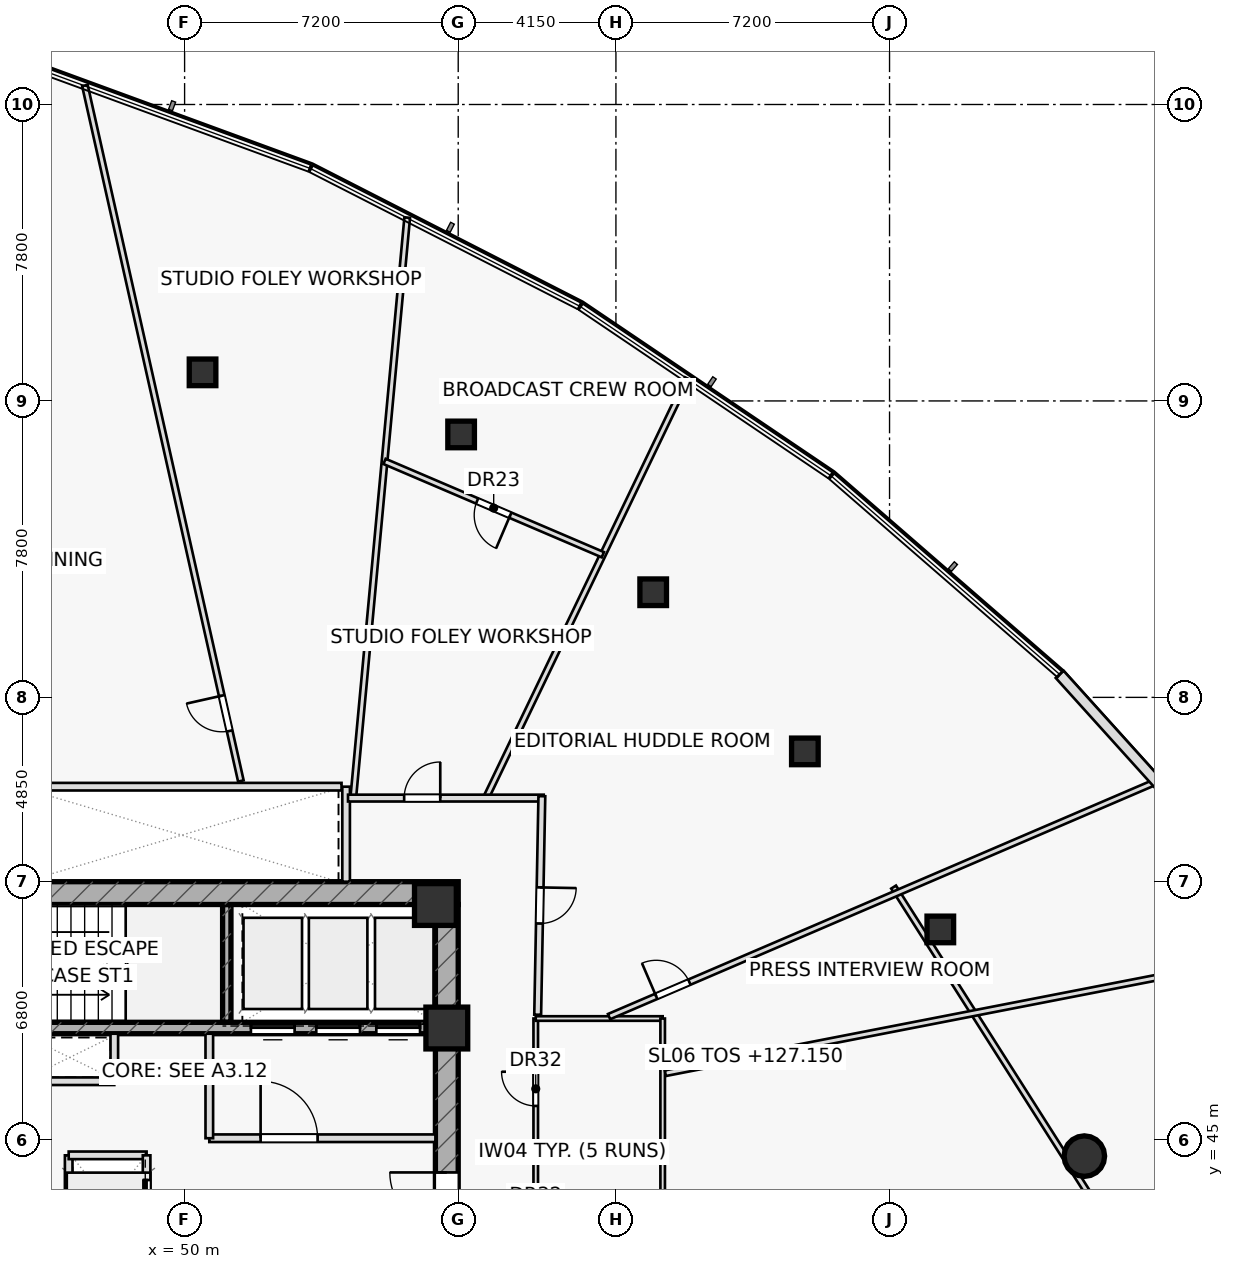
"""IFC4 building model, lengths in metres.
Left out: names, types, materials, properties, quantities, classifications, styles, units other than length and angle.
Written with IfcOpenShell. Run it as: python <this file> out.ifc"""

import sys

from ifc_helpers import new_model, si_unit, direction, frame, frame_2d, origin, origin_2d, place, context, subcontext, project, spatial, rectangle, hollow_rectangle, hollow_circle, extrude, element, fill, save


model = new_model("IFC4")
c1 = context("Model", 3, precision=1e-05, world=origin(), true_north=direction((0.0, 1.0)))
c2 = subcontext(c1, "Body", "Model", "MODEL_VIEW")
j1 = project(units=[si_unit("LENGTHUNIT", "METRE"), si_unit("PLANEANGLEUNIT", "RADIAN")], contexts=[c1])
p1 = place(None, origin())
s1 = spatial("IfcSite", under=j1, at=p1, CompositionType="ELEMENT")
p2 = place(p1, origin())
s2 = spatial("IfcBuilding", under=s1, at=p2, CompositionType="ELEMENT")
p3 = place(p2, frame((0.0, 0.0, 127.15)))
s3 = spatial("IfcBuildingStorey", under=s2, at=p3, CompositionType="ELEMENT", Elevation=127.15)
p4 = place(p3, frame((51.11, 48.1, 0.0), z_axis=(0.0, 0.0, 1.0), x_axis=(0.0, 1.0, 0.0)))
e1 = element("IfcWall", 1, at=p4, inside=s3, PredefinedType="SHEAR", context=c2, shape_type="SweptSolid", body=[
    extrude(rectangle(XDim=3.1, YDim=0.22, at=frame_2d((1.55, 0.0))), origin(), (0.0, 0.0, 1.0), 3.55),
])
p5 = place(p3, frame((42.8, 51.5, 0.0), z_axis=(0.0, 0.0, 1.0), x_axis=(1.0, 0.0, 0.0)))
e2 = element("IfcWall", 2, at=p5, inside=s3, PredefinedType="SHEAR", context=c2, shape_type="SweptSolid", body=[
    extrude(rectangle(XDim=14.4, YDim=0.6, at=frame_2d((7.2, 0.0))), origin(), (0.0, 0.0, 1.0), 3.55),
])
p6 = place(p5, frame((0.88, 0.0, 0.0)))
e3 = element("IfcOpeningElement", 3, at=p6, cuts=e2, PredefinedType="OPENING", context=c2, shape_type="SweptSolid", body=[
    extrude(rectangle(XDim=1.05, YDim=2.2, at=frame_2d((0.525, 1.1))), frame((0.0, 0.31, 0.0), z_axis=(0.0, -1.0, 0.0), x_axis=(1.0, 0.0, 0.0)), (0.0, 0.0, 1.0), 0.62),
])
p7 = place(p3, frame((56.9, 38.8, 0.0), z_axis=(0.0, 0.0, 1.0), x_axis=(0.0, 1.0, 0.0)))
e4 = element("IfcWall", 4, at=p7, inside=s3, PredefinedType="SHEAR", context=c2, shape_type="SweptSolid", body=[
    extrude(rectangle(XDim=12.4, YDim=0.6, at=frame_2d((6.2, 0.0))), origin(), (0.0, 0.0, 1.0), 3.55),
])
p8 = place(p7, frame((3.85, 0.0, 0.0)))
e5 = element("IfcOpeningElement", 5, at=p8, cuts=e4, PredefinedType="OPENING", context=c2, shape_type="SweptSolid", body=[
    extrude(rectangle(XDim=1.5, YDim=2.2, at=frame_2d((0.75, 1.1))), frame((0.0, 0.31, 0.0), z_axis=(0.0, -1.0, 0.0), x_axis=(1.0, 0.0, 0.0)), (0.0, 0.0, 1.0), 0.62),
])
p9 = place(p3, frame((43.4, 47.95, 0.0), z_axis=(0.0, 0.0, 1.0), x_axis=(1.0, 0.0, 0.0)))
e6 = element("IfcWall", 6, at=p9, inside=s3, PredefinedType="SHEAR", context=c2, shape_type="SweptSolid", body=[
    extrude(rectangle(XDim=13.2, YDim=0.3, at=frame_2d((6.6, 0.0))), origin(), (0.0, 0.0, 1.0), 3.55),
])
p10 = place(p9, frame((8.345, 0.0, 0.0)))
e7 = element("IfcOpeningElement", 7, at=p10, cuts=e6, PredefinedType="OPENING", context=c2, shape_type="SweptSolid", body=[
    extrude(rectangle(XDim=1.15, YDim=2.2, at=frame_2d((0.575, 1.1))), frame((0.0, 0.16, 0.0), z_axis=(0.0, -1.0, 0.0), x_axis=(1.0, 0.0, 0.0)), (0.0, 0.0, 1.0), 0.32),
])
p11 = place(p9, frame((10.065, 0.0, 0.0)))
e8 = element("IfcOpeningElement", 8, at=p11, cuts=e6, PredefinedType="OPENING", context=c2, shape_type="SweptSolid", body=[
    extrude(rectangle(XDim=1.15, YDim=2.2, at=frame_2d((0.575, 1.1))), frame((0.0, 0.16, 0.0), z_axis=(0.0, -1.0, 0.0), x_axis=(1.0, 0.0, 0.0)), (0.0, 0.0, 1.0), 0.32),
])
p12 = place(p9, frame((11.645, 0.0, 0.0)))
e9 = element("IfcOpeningElement", 9, at=p12, cuts=e6, PredefinedType="OPENING", context=c2, shape_type="SweptSolid", body=[
    extrude(rectangle(XDim=1.15, YDim=2.2, at=frame_2d((0.575, 1.1))), frame((0.0, 0.16, 0.0), z_axis=(0.0, -1.0, 0.0), x_axis=(1.0, 0.0, 0.0)), (0.0, 0.0, 1.0), 0.32),
])
for number, where, z_axis, x_axis in (
    (10, (56.9, 47.95, 0.0), (0.0, 0.0, 1.0), (1.0, 0.0, 0.0)),
    (11, (56.6, 51.2, 0.0), (0.0, 0.0, 1.0), (1.0, 0.0, 0.0)),
):
    element("IfcColumn", number, at=place(p3, frame(where, z_axis=z_axis, x_axis=x_axis)), inside=s3, PredefinedType="COLUMN", context=c2, shape_type="SweptSolid", body=[
        extrude(rectangle(XDim=1.1, YDim=1.1, at=origin_2d()), origin(), (0.0, 0.0, 1.0), 3.55),
    ])
p13 = place(p3, frame((73.676, 44.58, 0.0), z_axis=(0.0, 0.0, 1.0), x_axis=(1.0, 0.0, 0.0)))
e12 = element("IfcColumn", 12, at=p13, inside=s3, PredefinedType="COLUMN", context=c2, shape_type="SweptSolid", body=[
    extrude(hollow_circle(Radius=0.533, WallThickness=0.045, at=origin_2d()), origin(), (0.0, 0.0, 1.0), 3.55),
])
for number, where, z_axis, x_axis in (
    (13, (69.886, 50.544, 0.0), (0.0, 0.0, 1.0), (1.0, 0.0, 0.0)),
    (14, (66.322, 55.229, 0.0), (0.0, 0.0, 1.0), (1.0, 0.0, 0.0)),
    (15, (62.331, 59.416, 0.0), (0.0, 0.0, 1.0), (1.0, 0.0, 0.0)),
    (16, (57.277, 63.568, 0.0), (0.0, 0.0, 1.0), (1.0, 0.0, 0.0)),
    (17, (50.472, 65.202, 0.0), (0.0, 0.0, 1.0), (1.0, 0.0, 0.0)),
):
    element("IfcColumn", number, at=place(p3, frame(where, z_axis=z_axis, x_axis=x_axis)), inside=s3, PredefinedType="COLUMN", context=c2, shape_type="SweptSolid", body=[
        extrude(hollow_rectangle(XDim=0.7, YDim=0.7, WallThickness=0.04, at=origin_2d()), origin(), (0.0, 0.0, 1.0), 3.55),
    ])
p14 = place(p3, frame((54.25, 51.8, 0.0), z_axis=(0.0, 0.0, 1.0), x_axis=(0.0, 1.0, 0.0)))
e18 = element("IfcWall", 18, at=p14, inside=s3, PredefinedType="PARTITIONING", context=c2, shape_type="SweptSolid", body=[
    extrude(rectangle(XDim=2.5, YDim=0.2, at=frame_2d((1.25, 0.0))), origin(), (0.0, 0.0, 1.0), 3.55),
])
p15 = place(p3, frame((45.75, 46.55, 0.0), z_axis=(0.0, 0.0, 1.0), x_axis=(1.0, 0.0, 0.0)))
e19 = element("IfcWall", 19, at=p15, inside=s3, PredefinedType="PARTITIONING", context=c2, shape_type="SweptSolid", body=[
    extrude(rectangle(XDim=2.4, YDim=0.2, at=frame_2d((1.2, 0.0))), origin(), (0.0, 0.0, 1.0), 3.55),
])
p16 = place(p3, frame((48.15, 46.55, 0.0), z_axis=(0.0, 0.0, 1.0), x_axis=(0.0, 1.0, 0.0)))
e20 = element("IfcWall", 20, at=p16, inside=s3, PredefinedType="PARTITIONING", context=c2, shape_type="SweptSolid", body=[
    extrude(rectangle(XDim=1.25, YDim=0.2, at=frame_2d((0.625, 0.0))), origin(), (0.0, 0.0, 1.0), 3.55),
])
p17 = place(p3, frame((46.95, 42.2, 0.0), z_axis=(0.0, 0.0, 1.0), x_axis=(0.0, 1.0, 0.0)))
e21 = element("IfcWall", 21, at=p17, inside=s3, PredefinedType="PARTITIONING", context=c2, shape_type="SweptSolid", body=[
    extrude(rectangle(XDim=2.4, YDim=0.2, at=frame_2d((1.2, 0.0))), origin(), (0.0, 0.0, 1.0), 3.55),
])
p18 = place(p3, frame((46.95, 44.6, 0.0), z_axis=(0.0, 0.0, 1.0), x_axis=(1.0, 0.0, 0.0)))
e22 = element("IfcWall", 22, at=p18, inside=s3, PredefinedType="PARTITIONING", context=c2, shape_type="SweptSolid", body=[
    extrude(rectangle(XDim=2.05, YDim=0.2, at=frame_2d((1.025, 0.0))), origin(), (0.0, 0.0, 1.0), 3.55),
])
p19 = place(p3, frame((50.65, 45.05, 0.0), z_axis=(0.0, 0.0, 1.0), x_axis=(1.0, 0.0, 0.0)))
e23 = element("IfcWall", 23, at=p19, inside=s3, PredefinedType="PARTITIONING", context=c2, shape_type="SweptSolid", body=[
    extrude(rectangle(XDim=5.95, YDim=0.2, at=frame_2d((2.975, 0.0))), origin(), (0.0, 0.0, 1.0), 3.55),
])
p20 = place(p19, frame((1.35, 0.0, 0.0)))
e24 = element("IfcOpeningElement", 24, at=p20, cuts=e23, PredefinedType="OPENING", context=c2, shape_type="SweptSolid", body=[
    extrude(rectangle(XDim=1.5, YDim=2.2, at=frame_2d((0.75, 1.1))), frame((0.0, 0.11, 0.0), z_axis=(0.0, -1.0, 0.0), x_axis=(1.0, 0.0, 0.0)), (0.0, 0.0, 1.0), 0.22),
])
p21 = place(p3, frame((50.65, 45.05, 0.0), z_axis=(0.0, 0.0, 1.0), x_axis=(0.0, 1.0, 0.0)))
e25 = element("IfcWall", 25, at=p21, inside=s3, PredefinedType="PARTITIONING", context=c2, shape_type="SweptSolid", body=[
    extrude(rectangle(XDim=2.75, YDim=0.2, at=frame_2d((1.375, 0.0))), origin(), (0.0, 0.0, 1.0), 3.55),
])
p22 = place(p3, frame((74.163, 42.993, 0.0), z_axis=(0.0, 0.0, 1.0), x_axis=(-0.53628142437, 0.844039237166, 0.0)))
e26 = element("IfcWall", 26, at=p22, inside=s3, PredefinedType="PARTITIONING", context=c2, shape_type="SweptSolid", body=[
    extrude(rectangle(XDim=10.267, YDim=0.15, at=frame_2d((5.133, 0.0))), origin(), (0.0, 0.0, 1.0), 2.835),
])
p23 = place(p3, frame((59.24, 41.2, 0.0), z_axis=(0.0, 0.0, 1.0), x_axis=(0.0, 1.0, 0.0)))
e27 = element("IfcWall", 27, at=p23, inside=s3, PredefinedType="PARTITIONING", context=c2, shape_type="SweptSolid", body=[
    extrude(rectangle(XDim=7.0, YDim=0.12, at=frame_2d((3.5, 0.0))), origin(), (0.0, 0.0, 1.0), 3.55),
])
p24 = place(p23, frame((1.15, 0.0, 0.0)))
e28 = element("IfcOpeningElement", 28, at=p24, cuts=e27, PredefinedType="OPENING", context=c2, shape_type="SweptSolid", body=[
    extrude(rectangle(XDim=0.9, YDim=2.05, at=frame_2d((0.45, 1.025))), frame((0.0, 0.07, 0.0), z_axis=(0.0, -1.0, 0.0), x_axis=(1.0, 0.0, 0.0)), (0.0, 0.0, 1.0), 0.14),
])
p25 = place(p23, frame((4.7, 0.0, 0.0)))
e29 = element("IfcOpeningElement", 29, at=p25, cuts=e27, PredefinedType="OPENING", context=c2, shape_type="SweptSolid", body=[
    extrude(rectangle(XDim=0.9, YDim=2.05, at=frame_2d((0.45, 1.025))), frame((0.0, 0.07, 0.0), z_axis=(0.0, -1.0, 0.0), x_axis=(1.0, 0.0, 0.0)), (0.0, 0.0, 1.0), 0.14),
])
for number, where, z_axis, x_axis in (
    (30, (59.24, 44.65, 0.0), (0.0, 0.0, 1.0), (1.0, 0.0, 0.0)),
    (31, (59.24, 48.2, 0.0), (0.0, 0.0, 1.0), (1.0, 0.0, 0.0)),
):
    element("IfcWall", number, at=place(p3, frame(where, z_axis=z_axis, x_axis=x_axis)), inside=s3, PredefinedType="PARTITIONING", context=c2, shape_type="SweptSolid", body=[
        extrude(rectangle(XDim=3.34, YDim=0.12, at=frame_2d((1.67, 0.0))), origin(), (0.0, 0.0, 1.0), 3.55),
    ])
p26 = place(p3, frame((62.58, 41.2, 0.0), z_axis=(0.0, 0.0, 1.0), x_axis=(0.0, 1.0, 0.0)))
e32 = element("IfcWall", 32, at=p26, inside=s3, PredefinedType="PARTITIONING", context=c2, shape_type="SweptSolid", body=[
    extrude(rectangle(XDim=7.0, YDim=0.12, at=frame_2d((3.5, 0.0))), origin(), (0.0, 0.0, 1.0), 3.55),
])
p27 = place(p3, frame((62.65, 46.76, 0.0), z_axis=(0.0, 0.0, 1.0), x_axis=(0.981595107756, 0.190973936517, 0.0)))
e33 = element("IfcWall", 33, at=p27, inside=s3, PredefinedType="PARTITIONING", context=c2, shape_type="SweptSolid", body=[
    extrude(rectangle(XDim=16.982, YDim=0.15, at=frame_2d((8.491, 0.0))), origin(), (0.0, 0.0, 1.0), 2.975),
])
p28 = place(p3, frame((61.169, 48.25, 0.0), z_axis=(0.0, 0.0, 1.0), x_axis=(0.918885604768, 0.394524074488, 0.0)))
e34 = element("IfcWall", 34, at=p28, inside=s3, PredefinedType="PARTITIONING", context=c2, shape_type="SweptSolid", body=[
    extrude(rectangle(XDim=15.686, YDim=0.15, at=frame_2d((7.843, 0.0))), origin(), (0.0, 0.0, 1.0), 2.835),
])
p29 = place(p28, frame((1.35, 0.0, 0.0)))
e35 = element("IfcOpeningElement", 35, at=p29, cuts=e34, PredefinedType="OPENING", context=c2, shape_type="SweptSolid", body=[
    extrude(rectangle(XDim=0.95, YDim=2.05, at=frame_2d((0.475, 1.025))), frame((0.0, 0.085, 0.0), z_axis=(0.0, -1.0, 0.0), x_axis=(1.0, 0.0, 0.0)), (0.0, 0.0, 1.0), 0.17),
])
p30 = place(p3, frame((57.927, 54.0, 0.0), z_axis=(0.0, 0.0, 1.0), x_axis=(0.433312802005, 0.901243593941, 0.0)))
e36 = element("IfcWall", 36, at=p30, inside=s3, PredefinedType="PARTITIONING", context=c2, shape_type="SweptSolid", body=[
    extrude(rectangle(XDim=12.25, YDim=0.15, at=frame_2d((6.125, 0.0))), origin(), (0.0, 0.0, 1.0), 2.975),
])
p31 = place(p3, frame((54.437, 54.0, 0.0), z_axis=(0.0, 0.0, 1.0), x_axis=(0.092609058271, 0.995702547112, 0.0)))
e37 = element("IfcWall", 37, at=p31, inside=s3, PredefinedType="PARTITIONING", context=c2, shape_type="SweptSolid", body=[
    extrude(rectangle(XDim=15.34, YDim=0.15, at=frame_2d((7.67, 0.0))), origin(), (0.0, 0.0, 1.0), 2.835),
])
p32 = place(p3, frame((51.481, 54.45, 0.0), z_axis=(0.0, 0.0, 1.0), x_axis=(-0.218833477921, 0.975762219468, 0.0)))
e38 = element("IfcWall", 38, at=p32, inside=s3, PredefinedType="PARTITIONING", context=c2, shape_type="SweptSolid", body=[
    extrude(rectangle(XDim=18.755, YDim=0.15, at=frame_2d((9.377, 0.0))), origin(), (0.0, 0.0, 1.0), 2.975),
])
p33 = place(p32, frame((1.35, 0.0, 0.0)))
e39 = element("IfcOpeningElement", 39, at=p33, cuts=e38, PredefinedType="OPENING", context=c2, shape_type="SweptSolid", body=[
    extrude(rectangle(XDim=0.95, YDim=2.05, at=frame_2d((0.475, 1.025))), frame((0.0, 0.085, 0.0), z_axis=(0.0, -1.0, 0.0), x_axis=(1.0, 0.0, 0.0)), (0.0, 0.0, 1.0), 0.17),
])
p34 = place(p3, frame((61.006, 60.403, 0.0), z_axis=(0.0, 0.0, 1.0), x_axis=(-0.919502415625, 0.393084351839, 0.0)))
e40 = element("IfcWall", 40, at=p34, inside=s3, PredefinedType="PARTITIONING", context=c2, shape_type="SweptSolid", body=[
    extrude(rectangle(XDim=6.248, YDim=0.15, at=frame_2d((3.124, 0.0))), origin(), (0.0, 0.0, 1.0), 2.835),
])
p35 = place(p34, frame((2.649, 0.0, 0.0)))
e41 = element("IfcOpeningElement", 41, at=p35, cuts=e40, PredefinedType="OPENING", context=c2, shape_type="SweptSolid", body=[
    extrude(rectangle(XDim=0.95, YDim=2.05, at=frame_2d((0.475, 1.025))), frame((0.0, 0.085, 0.0), z_axis=(0.0, -1.0, 0.0), x_axis=(1.0, 0.0, 0.0)), (0.0, 0.0, 1.0), 0.17),
])
p36 = place(p3, frame((54.3, 54.0, 0.0), z_axis=(0.0, 0.0, 1.0), x_axis=(1.0, 0.0, 0.0)))
e42 = element("IfcWall", 42, at=p36, inside=s3, PredefinedType="PARTITIONING", context=c2, shape_type="SweptSolid", body=[
    extrude(rectangle(XDim=5.15, YDim=0.18, at=frame_2d((2.575, 0.0))), origin(), (0.0, 0.0, 1.0), 2.835),
])
p37 = place(p36, frame((1.477, 0.0, 0.0)))
e43 = element("IfcOpeningElement", 43, at=p37, cuts=e42, PredefinedType="OPENING", context=c2, shape_type="SweptSolid", body=[
    extrude(rectangle(XDim=0.95, YDim=2.05, at=frame_2d((0.475, 1.025))), frame((0.0, 0.1, 0.0), z_axis=(0.0, -1.0, 0.0), x_axis=(1.0, 0.0, 0.0)), (0.0, 0.0, 1.0), 0.2),
])
p38 = place(p3, frame((59.401, 54.05, 0.0), z_axis=(0.0, 0.0, 1.0), x_axis=(-0.019103170983, -0.999817517779, 0.0)))
e44 = element("IfcWall", 44, at=p38, inside=s3, PredefinedType="PARTITIONING", context=c2, shape_type="SweptSolid", body=[
    extrude(rectangle(XDim=5.751, YDim=0.18, at=frame_2d((2.875, 0.0))), origin(), (0.0, 0.0, 1.0), 2.835),
])
p39 = place(p38, frame((2.4, 0.0, 0.0)))
e45 = element("IfcOpeningElement", 45, at=p39, cuts=e44, PredefinedType="OPENING", context=c2, shape_type="SweptSolid", body=[
    extrude(rectangle(XDim=0.95, YDim=2.05, at=frame_2d((0.475, 1.025))), frame((0.0, 0.1, 0.0), z_axis=(0.0, -1.0, 0.0), x_axis=(1.0, 0.0, 0.0)), (0.0, 0.0, 1.0), 0.2),
])
p40 = place(p3, frame((78.38, 51.325, 0.0), z_axis=(0.0, 0.0, 1.0), x_axis=(-0.670078304424, 0.742290418866, 0.0)))
e46 = element("IfcWall", 46, at=p40, inside=s3, PredefinedType="STANDARD", context=c2, shape_type="SweptSolid", body=[
    extrude(rectangle(XDim=7.989, YDim=0.28, at=frame_2d((3.995, 0.0))), origin(), (0.0, 0.0, 1.0), 3.55),
])
p41 = place(p3, frame((49.0, 42.2, 0.0), z_axis=(0.0, 0.0, 1.0), x_axis=(0.0, 1.0, 0.0)))
e47 = element("IfcWall", 47, at=p41, inside=s3, PredefinedType="PARTITIONING", context=c2, shape_type="SweptSolid", body=[
    extrude(rectangle(XDim=2.4, YDim=0.2, at=frame_2d((1.2, 0.0))), origin(), (0.0, 0.0, 1.0), 3.55),
])
p42 = place(p41, frame((0.65, 0.0, 0.0)))
e48 = element("IfcOpeningElement", 48, at=p42, cuts=e47, PredefinedType="OPENING", context=c2, shape_type="SweptSolid", body=[
    extrude(rectangle(XDim=1.1, YDim=2.15, at=frame_2d((0.55, 1.075))), frame((0.0, 0.11, 0.0), z_axis=(0.0, -1.0, 0.0), x_axis=(1.0, 0.0, 0.0)), (0.0, 0.0, 1.0), 0.22),
])
p43 = place(p3, frame((45.82, 54.3, 0.0), z_axis=(0.0, 0.0, 1.0), x_axis=(1.0, 0.0, 0.0)))
e49 = element("IfcWall", 49, at=p43, inside=s3, PredefinedType="PARTITIONING", context=c2, shape_type="SweptSolid", body=[
    extrude(rectangle(XDim=8.31, YDim=0.2, at=frame_2d((4.155, 0.0))), origin(), (0.0, 0.0, 1.0), 3.55),
])
p44 = place(p8, origin())
e50 = element("IfcDoor", 50, at=p44, inside=s3, OperationType="SINGLE_SWING_RIGHT", PredefinedType="DOOR", context=c2, shape_type="SweptSolid", body=[
    extrude(rectangle(XDim=1.5, YDim=2.2, at=frame_2d((0.75, 1.1))), frame((0.0, 0.025, 0.0), z_axis=(0.0, -1.0, 0.0), x_axis=(1.0, 0.0, 0.0)), (0.0, 0.0, 1.0), 0.05),
])
fill(e5, e50)
p45 = place(p20, origin())
e51 = element("IfcDoor", 51, at=p45, inside=s3, OperationType="SINGLE_SWING_LEFT", PredefinedType="DOOR", context=c2, shape_type="SweptSolid", body=[
    extrude(rectangle(XDim=1.5, YDim=2.2, at=frame_2d((0.75, 1.1))), frame((0.0, 0.025, 0.0), z_axis=(0.0, -1.0, 0.0), x_axis=(1.0, 0.0, 0.0)), (0.0, 0.0, 1.0), 0.05),
])
fill(e24, e51)
p46 = place(p25, origin())
e52 = element("IfcDoor", 52, at=p46, inside=s3, OperationType="SINGLE_SWING_RIGHT", PredefinedType="DOOR", context=c2, shape_type="SweptSolid", body=[
    extrude(rectangle(XDim=0.9, YDim=2.05, at=frame_2d((0.45, 1.025))), frame((0.0, 0.025, 0.0), z_axis=(0.0, -1.0, 0.0), x_axis=(1.0, 0.0, 0.0)), (0.0, 0.0, 1.0), 0.05),
])
fill(e29, e52)
p47 = place(p29, origin())
e53 = element("IfcDoor", 53, at=p47, inside=s3, OperationType="SINGLE_SWING_LEFT", PredefinedType="DOOR", context=c2, shape_type="SweptSolid", body=[
    extrude(rectangle(XDim=0.95, YDim=2.05, at=frame_2d((0.475, 1.025))), frame((0.0, 0.025, 0.0), z_axis=(0.0, -1.0, 0.0), x_axis=(1.0, 0.0, 0.0)), (0.0, 0.0, 1.0), 0.05),
])
fill(e35, e53)
p48 = place(p33, origin())
e54 = element("IfcDoor", 54, at=p48, inside=s3, OperationType="SINGLE_SWING_RIGHT", PredefinedType="DOOR", context=c2, shape_type="SweptSolid", body=[
    extrude(rectangle(XDim=0.95, YDim=2.05, at=frame_2d((0.475, 1.025))), frame((0.0, 0.025, 0.0), z_axis=(0.0, -1.0, 0.0), x_axis=(1.0, 0.0, 0.0)), (0.0, 0.0, 1.0), 0.05),
])
fill(e39, e54)
p49 = place(p35, origin())
e55 = element("IfcDoor", 55, at=p49, inside=s3, OperationType="SINGLE_SWING_LEFT", PredefinedType="DOOR", context=c2, shape_type="SweptSolid", body=[
    extrude(rectangle(XDim=0.95, YDim=2.05, at=frame_2d((0.475, 1.025))), frame((0.0, 0.025, 0.0), z_axis=(0.0, -1.0, 0.0), x_axis=(1.0, 0.0, 0.0)), (0.0, 0.0, 1.0), 0.05),
])
fill(e41, e55)
p50 = place(p37, origin())
e56 = element("IfcDoor", 56, at=p50, inside=s3, OperationType="SINGLE_SWING_RIGHT", PredefinedType="DOOR", context=c2, shape_type="SweptSolid", body=[
    extrude(rectangle(XDim=0.95, YDim=2.05, at=frame_2d((0.475, 1.025))), frame((0.0, 0.025, 0.0), z_axis=(0.0, -1.0, 0.0), x_axis=(1.0, 0.0, 0.0)), (0.0, 0.0, 1.0), 0.05),
])
fill(e43, e56)
p51 = place(p39, origin())
e57 = element("IfcDoor", 57, at=p51, inside=s3, OperationType="SINGLE_SWING_LEFT", PredefinedType="DOOR", context=c2, shape_type="SweptSolid", body=[
    extrude(rectangle(XDim=0.95, YDim=2.05, at=frame_2d((0.475, 1.025))), frame((0.0, 0.025, 0.0), z_axis=(0.0, -1.0, 0.0), x_axis=(1.0, 0.0, 0.0)), (0.0, 0.0, 1.0), 0.05),
])
fill(e45, e57)
p52 = place(p10, origin())
e58 = element("IfcDoor", 58, at=p52, inside=s3, OperationType="SLIDING_TO_LEFT", PredefinedType="DOOR", context=c2, shape_type="SweptSolid", body=[
    extrude(rectangle(XDim=1.15, YDim=2.2, at=frame_2d((0.575, 1.1))), frame((0.0, 0.025, 0.0), z_axis=(0.0, -1.0, 0.0), x_axis=(1.0, 0.0, 0.0)), (0.0, 0.0, 1.0), 0.05),
])
fill(e7, e58)
p53 = place(p11, origin())
e59 = element("IfcDoor", 59, at=p53, inside=s3, OperationType="SLIDING_TO_LEFT", PredefinedType="DOOR", context=c2, shape_type="SweptSolid", body=[
    extrude(rectangle(XDim=1.15, YDim=2.2, at=frame_2d((0.575, 1.1))), frame((0.0, 0.025, 0.0), z_axis=(0.0, -1.0, 0.0), x_axis=(1.0, 0.0, 0.0)), (0.0, 0.0, 1.0), 0.05),
])
fill(e8, e59)
p54 = place(p12, origin())
e60 = element("IfcDoor", 60, at=p54, inside=s3, OperationType="SLIDING_TO_LEFT", PredefinedType="DOOR", context=c2, shape_type="SweptSolid", body=[
    extrude(rectangle(XDim=1.15, YDim=2.2, at=frame_2d((0.575, 1.1))), frame((0.0, 0.025, 0.0), z_axis=(0.0, -1.0, 0.0), x_axis=(1.0, 0.0, 0.0)), (0.0, 0.0, 1.0), 0.05),
])
fill(e9, e60)
p55 = place(p42, origin())
e61 = element("IfcDoor", 61, at=p55, inside=s3, OperationType="SLIDING_TO_RIGHT", PredefinedType="DOOR", context=c2, shape_type="SweptSolid", body=[
    extrude(rectangle(XDim=1.1, YDim=2.15, at=frame_2d((0.55, 1.075))), frame((0.0, 0.025, 0.0), z_axis=(0.0, -1.0, 0.0), x_axis=(1.0, 0.0, 0.0)), (0.0, 0.0, 1.0), 0.05),
])
fill(e48, e61)
save(model, sys.argv[1])
